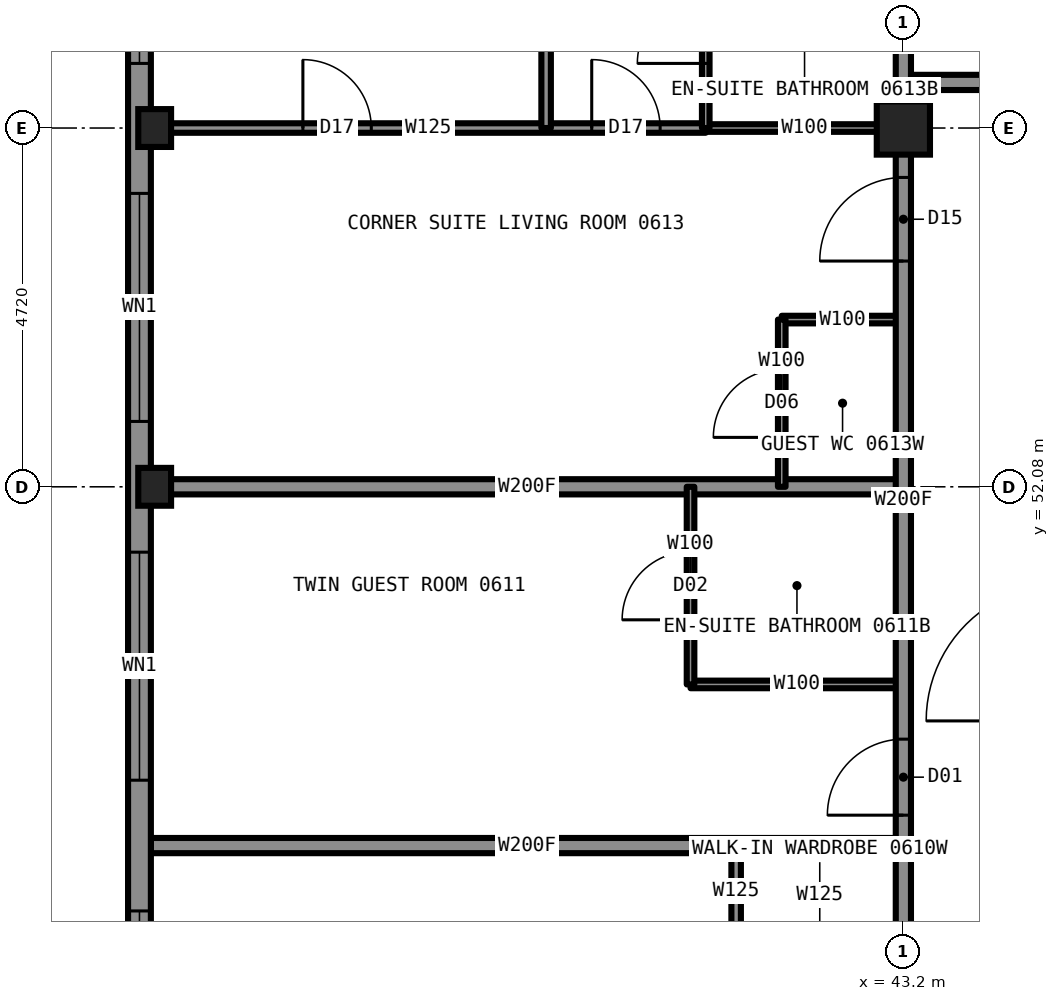
"""IFC4 building model, lengths in metres.
Left out: names, types, materials, properties, quantities, classifications, styles, units other than length and angle.
Written with IfcOpenShell. Run it as: python <this file> out.ifc"""

import sys

from ifc_helpers import new_model, si_unit, direction, frame, frame_2d, origin, origin_2d, place, context, subcontext, project, spatial, rectangle, hollow_rectangle, i_section, extrude, element, fill, save


model = new_model("IFC4")
c1 = context("Model", 3, precision=1e-05, world=origin(), true_north=direction((0.0, 1.0)))
c2 = subcontext(c1, "Body", "Model", "MODEL_VIEW")
j1 = project(units=[si_unit("LENGTHUNIT", "METRE"), si_unit("PLANEANGLEUNIT", "RADIAN")], contexts=[c1])
p1 = place(None, origin())
s1 = spatial("IfcSite", under=j1, at=p1, CompositionType="ELEMENT")
p2 = place(p1, origin())
s2 = spatial("IfcBuilding", under=s1, at=p2, CompositionType="ELEMENT")
p3 = place(p2, frame((0.0, 0.0, 28.5)))
s3 = spatial("IfcBuildingStorey", under=s2, at=p3, CompositionType="ELEMENT", Elevation=28.5)
for number, where, z_axis, x_axis in (
    (1, (33.35, 52.08, 0.0), (0.0, 0.0, 1.0), (1.0, 0.0, 0.0)),
    (2, (33.35, 56.8, 0.0), (0.0, 0.0, 1.0), (1.0, 0.0, 0.0)),
):
    element("IfcColumn", number, at=place(p3, frame(where, z_axis=z_axis, x_axis=x_axis)), inside=s3, PredefinedType="COLUMN", context=c2, shape_type="SweptSolid", body=[
        extrude(i_section(OverallWidth=0.432, OverallDepth=0.498, WebThickness=0.056, FlangeThickness=0.089, at=origin_2d()), origin(), (0.0, 0.0, 1.0), 3.5),
    ])
p4 = place(p3, frame((43.2, 56.8, 0.0), z_axis=(0.0, 0.0, 1.0), x_axis=(1.0, 0.0, 0.0)))
e3 = element("IfcColumn", 3, at=p4, inside=s3, PredefinedType="COLUMN", context=c2, shape_type="SweptSolid", body=[
    extrude(hollow_rectangle(XDim=0.7, YDim=0.7, WallThickness=0.06, at=origin_2d()), origin(), (0.0, 0.0, 1.0), 3.5),
])
p5 = place(p3, frame((40.6, 56.8, 0.0), z_axis=(0.0, 0.0, 1.0), x_axis=(1.0, 0.0, 0.0)))
e4 = element("IfcWall", 4, at=p5, inside=s3, PredefinedType="PARTITIONING", context=c2, shape_type="SweptSolid", body=[
    extrude(rectangle(XDim=2.6, YDim=0.1, at=frame_2d((1.3, 0.0))), origin(), (0.0, 0.0, 1.0), 2.573),
])
p6 = place(p3, frame((33.3, 56.8, 0.0), z_axis=(0.0, 0.0, 1.0), x_axis=(1.0, 0.0, 0.0)))
e5 = element("IfcWall", 5, at=p6, inside=s3, PredefinedType="PARTITIONING", context=c2, shape_type="SweptSolid", body=[
    extrude(rectangle(XDim=7.3, YDim=0.125, at=frame_2d((3.65, 0.0))), origin(), (0.0, 0.0, 1.0), 2.573),
])
p7 = place(p6, frame((5.8, 0.0, 0.0)))
e6 = element("IfcOpeningElement", 6, at=p7, cuts=e5, PredefinedType="OPENING", context=c2, shape_type="SweptSolid", body=[
    extrude(rectangle(XDim=0.9, YDim=2.2, at=frame_2d((0.45, 1.1))), frame((0.0, 0.073, 0.0), z_axis=(0.0, -1.0, 0.0), x_axis=(1.0, 0.0, 0.0)), (0.0, 0.0, 1.0), 0.145),
])
p8 = place(p6, frame((2.0, 0.0, 0.0)))
e7 = element("IfcOpeningElement", 7, at=p8, cuts=e5, PredefinedType="OPENING", context=c2, shape_type="SweptSolid", body=[
    extrude(rectangle(XDim=0.9, YDim=2.2, at=frame_2d((0.45, 1.1))), frame((0.0, 0.073, 0.0), z_axis=(0.0, -1.0, 0.0), x_axis=(1.0, 0.0, 0.0)), (0.0, 0.0, 1.0), 0.145),
])
p9 = place(p3, frame((43.2, 57.4, 0.0), z_axis=(0.0, 0.0, 1.0), x_axis=(1.0, 0.0, 0.0)))
e8 = element("IfcWall", 8, at=p9, inside=s3, PredefinedType="PARTITIONING", context=c2, shape_type="SweptSolid", body=[
    extrude(rectangle(XDim=23.6, YDim=0.2, at=frame_2d((11.8, 0.0))), origin(), (0.0, 0.0, 1.0), 3.33),
])
p10 = place(p9, frame((1.85, 0.0, 0.0)))
e9 = element("IfcOpeningElement", 9, at=p10, cuts=e8, PredefinedType="OPENING", context=c2, shape_type="SweptSolid", body=[
    extrude(rectangle(XDim=1.1, YDim=2.2, at=frame_2d((0.55, 1.1))), frame((0.0, 0.11, 0.0), z_axis=(0.0, -1.0, 0.0), x_axis=(1.0, 0.0, 0.0)), (0.0, 0.0, 1.0), 0.22),
])
p11 = place(p9, frame((15.62, 0.0, 0.0)))
e10 = element("IfcOpeningElement", 10, at=p11, cuts=e8, PredefinedType="OPENING", context=c2, shape_type="SweptSolid", body=[
    extrude(rectangle(XDim=1.0, YDim=2.2, at=frame_2d((0.5, 1.1))), frame((0.0, 0.11, 0.0), z_axis=(0.0, -1.0, 0.0), x_axis=(1.0, 0.0, 0.0)), (0.0, 0.0, 1.0), 0.22),
])
p12 = place(p9, frame((20.34, 0.0, 0.0)))
e11 = element("IfcOpeningElement", 11, at=p12, cuts=e8, PredefinedType="OPENING", context=c2, shape_type="SweptSolid", body=[
    extrude(rectangle(XDim=1.0, YDim=2.2, at=frame_2d((0.5, 1.1))), frame((0.0, 0.11, 0.0), z_axis=(0.0, -1.0, 0.0), x_axis=(1.0, 0.0, 0.0)), (0.0, 0.0, 1.0), 0.22),
])
p13 = place(p3, frame((33.3, 47.36, 0.0), z_axis=(0.0, 0.0, 1.0), x_axis=(1.0, 0.0, 0.0)))
e12 = element("IfcWall", 12, at=p13, inside=s3, PredefinedType="PARTITIONING", context=c2, shape_type="SweptSolid", body=[
    extrude(rectangle(XDim=9.9, YDim=0.2, at=frame_2d((4.95, 0.0))), origin(), (0.0, 0.0, 1.0), 2.723),
])
p14 = place(p3, frame((40.4, 49.48, 0.0), z_axis=(0.0, 0.0, 1.0), x_axis=(1.0, 0.0, 0.0)))
e13 = element("IfcWall", 13, at=p14, inside=s3, PredefinedType="PARTITIONING", context=c2, shape_type="SweptSolid", body=[
    extrude(rectangle(XDim=2.8, YDim=0.1, at=frame_2d((1.4, 0.0))), origin(), (0.0, 0.0, 1.0), 3.33),
])
p15 = place(p3, frame((33.3, 52.08, 0.0), z_axis=(0.0, 0.0, 1.0), x_axis=(1.0, 0.0, 0.0)))
e14 = element("IfcWall", 14, at=p15, inside=s3, PredefinedType="PARTITIONING", context=c2, shape_type="SweptSolid", body=[
    extrude(rectangle(XDim=9.9, YDim=0.2, at=frame_2d((4.95, 0.0))), origin(), (0.0, 0.0, 1.0), 2.573),
])
p16 = place(p3, frame((41.6, 54.28, 0.0), z_axis=(0.0, 0.0, 1.0), x_axis=(1.0, 0.0, 0.0)))
e15 = element("IfcWall", 15, at=p16, inside=s3, PredefinedType="PARTITIONING", context=c2, shape_type="SweptSolid", body=[
    extrude(rectangle(XDim=1.6, YDim=0.1, at=frame_2d((0.8, 0.0))), origin(), (0.0, 0.0, 1.0), 2.723),
])
p17 = place(p3, frame((43.2, 33.22, 0.0), z_axis=(0.0, 0.0, 1.0), x_axis=(0.0, 1.0, 0.0)))
e16 = element("IfcWall", 16, at=p17, inside=s3, PredefinedType="PARTITIONING", context=c2, shape_type="SweptSolid", body=[
    extrude(rectangle(XDim=23.56, YDim=0.2, at=frame_2d((11.78, 0.0))), origin(), (0.0, 0.0, 1.0), 3.33),
])
p18 = place(p17, frame((6.16, 0.0, 0.0)))
e17 = element("IfcOpeningElement", 17, at=p18, cuts=e16, PredefinedType="OPENING", context=c2, shape_type="SweptSolid", body=[
    extrude(rectangle(XDim=1.0, YDim=2.2, at=frame_2d((0.5, 1.1))), frame((0.0, 0.11, 0.0), z_axis=(0.0, -1.0, 0.0), x_axis=(1.0, 0.0, 0.0)), (0.0, 0.0, 1.0), 0.22),
])
p19 = place(p17, frame((11.68, 0.0, 0.0)))
e18 = element("IfcOpeningElement", 18, at=p19, cuts=e16, PredefinedType="OPENING", context=c2, shape_type="SweptSolid", body=[
    extrude(rectangle(XDim=1.0, YDim=2.2, at=frame_2d((0.5, 1.1))), frame((0.0, 0.11, 0.0), z_axis=(0.0, -1.0, 0.0), x_axis=(1.0, 0.0, 0.0)), (0.0, 0.0, 1.0), 0.22),
])
p20 = place(p17, frame((14.54, 0.0, 0.0)))
e19 = element("IfcOpeningElement", 19, at=p20, cuts=e16, PredefinedType="OPENING", context=c2, shape_type="SweptSolid", body=[
    extrude(rectangle(XDim=1.0, YDim=2.2, at=frame_2d((0.5, 1.1))), frame((0.0, 0.11, 0.0), z_axis=(0.0, -1.0, 0.0), x_axis=(1.0, 0.0, 0.0)), (0.0, 0.0, 1.0), 0.22),
])
p21 = place(p17, frame((21.83, 0.0, 0.0)))
e20 = element("IfcOpeningElement", 20, at=p21, cuts=e16, PredefinedType="OPENING", context=c2, shape_type="SweptSolid", body=[
    extrude(rectangle(XDim=1.1, YDim=2.2, at=frame_2d((0.55, 1.1))), frame((0.0, 0.11, 0.0), z_axis=(0.0, -1.0, 0.0), x_axis=(1.0, 0.0, 0.0)), (0.0, 0.0, 1.0), 0.22),
])
p22 = place(p17, frame((0.63, 0.0, 0.0)))
e21 = element("IfcOpeningElement", 21, at=p22, cuts=e16, PredefinedType="OPENING", context=c2, shape_type="SweptSolid", body=[
    extrude(rectangle(XDim=1.1, YDim=2.2, at=frame_2d((0.55, 1.1))), frame((0.0, 0.11, 0.0), z_axis=(0.0, -1.0, 0.0), x_axis=(1.0, 0.0, 0.0)), (0.0, 0.0, 1.0), 0.22),
])
p23 = place(p3, frame((43.2, 57.4, 0.0), z_axis=(0.0, 0.0, 1.0), x_axis=(0.0, 1.0, 0.0)))
e22 = element("IfcWall", 22, at=p23, inside=s3, PredefinedType="PARTITIONING", context=c2, shape_type="SweptSolid", body=[
    extrude(rectangle(XDim=2.0, YDim=0.2, at=frame_2d((1.0, 0.0))), origin(), (0.0, 0.0, 1.0), 2.573),
])
p24 = place(p3, frame((41.6, 52.08, 0.0), z_axis=(0.0, 0.0, 1.0), x_axis=(0.0, 1.0, 0.0)))
e23 = element("IfcWall", 23, at=p24, inside=s3, PredefinedType="PARTITIONING", context=c2, shape_type="SweptSolid", body=[
    extrude(rectangle(XDim=2.2, YDim=0.1, at=frame_2d((1.1, 0.0))), origin(), (0.0, 0.0, 1.0), 3.33),
])
p25 = place(p24, frame((0.65, 0.0, 0.0)))
e24 = element("IfcOpeningElement", 24, at=p25, cuts=e23, PredefinedType="OPENING", context=c2, shape_type="SweptSolid", body=[
    extrude(rectangle(XDim=0.9, YDim=2.1, at=frame_2d((0.45, 1.05))), frame((0.0, 0.06, 0.0), z_axis=(0.0, -1.0, 0.0), x_axis=(1.0, 0.0, 0.0)), (0.0, 0.0, 1.0), 0.12),
])
p26 = place(p3, frame((41.0, 46.16, 0.0), z_axis=(0.0, 0.0, 1.0), x_axis=(0.0, 1.0, 0.0)))
e25 = element("IfcWall", 25, at=p26, inside=s3, PredefinedType="PARTITIONING", context=c2, shape_type="SweptSolid", body=[
    extrude(rectangle(XDim=1.2, YDim=0.125, at=frame_2d((0.6, 0.0))), origin(), (0.0, 0.0, 1.0), 3.33),
])
p27 = place(p3, frame((40.6, 56.8, 0.0), z_axis=(0.0, 0.0, 1.0), x_axis=(0.0, 1.0, 0.0)))
e26 = element("IfcWall", 26, at=p27, inside=s3, PredefinedType="PARTITIONING", context=c2, shape_type="SweptSolid", body=[
    extrude(rectangle(XDim=2.6, YDim=0.1, at=frame_2d((1.3, 0.0))), origin(), (0.0, 0.0, 1.0), 3.33),
])
p28 = place(p27, frame((0.85, 0.0, 0.0)))
e27 = element("IfcOpeningElement", 27, at=p28, cuts=e26, PredefinedType="OPENING", context=c2, shape_type="SweptSolid", body=[
    extrude(rectangle(XDim=0.9, YDim=2.1, at=frame_2d((0.45, 1.05))), frame((0.0, 0.06, 0.0), z_axis=(0.0, -1.0, 0.0), x_axis=(1.0, 0.0, 0.0)), (0.0, 0.0, 1.0), 0.12),
])
p29 = place(p3, frame((40.4, 49.48, 0.0), z_axis=(0.0, 0.0, 1.0), x_axis=(0.0, 1.0, 0.0)))
e28 = element("IfcWall", 28, at=p29, inside=s3, PredefinedType="PARTITIONING", context=c2, shape_type="SweptSolid", body=[
    extrude(rectangle(XDim=2.6, YDim=0.1, at=frame_2d((1.3, 0.0))), origin(), (0.0, 0.0, 1.0), 3.33),
])
p30 = place(p29, frame((0.85, 0.0, 0.0)))
e29 = element("IfcOpeningElement", 29, at=p30, cuts=e28, PredefinedType="OPENING", context=c2, shape_type="SweptSolid", body=[
    extrude(rectangle(XDim=0.9, YDim=2.1, at=frame_2d((0.45, 1.05))), frame((0.0, 0.06, 0.0), z_axis=(0.0, -1.0, 0.0), x_axis=(1.0, 0.0, 0.0)), (0.0, 0.0, 1.0), 0.12),
])
p31 = place(p3, frame((38.5, 56.8, 0.0), z_axis=(0.0, 0.0, 1.0), x_axis=(0.0, 1.0, 0.0)))
e30 = element("IfcWall", 30, at=p31, inside=s3, PredefinedType="PARTITIONING", context=c2, shape_type="SweptSolid", body=[
    extrude(rectangle(XDim=9.894, YDim=0.125, at=frame_2d((4.947, 0.0))), origin(), (0.0, 0.0, 1.0), 3.33),
])
p32 = place(p3, frame((33.15, 61.5, 0.0), z_axis=(0.0, 0.0, 1.0), x_axis=(0.0, -1.0, 0.0)))
e31 = element("IfcWall", 31, at=p32, inside=s3, PredefinedType="SOLIDWALL", context=c2, shape_type="SweptSolid", body=[
    extrude(rectangle(XDim=33.0, YDim=0.3, at=frame_2d((16.5, 0.0))), origin(), (0.0, 0.0, 1.0), 2.83),
])
p33 = place(p32, frame((0.85, 0.0, 0.5)))
e32 = element("IfcOpeningElement", 32, at=p33, cuts=e31, PredefinedType="OPENING", context=c2, shape_type="SweptSolid", body=[
    extrude(rectangle(XDim=3.0, YDim=2.0, at=frame_2d((1.5, 1.0))), frame((0.0, 0.16, 0.0), z_axis=(0.0, -1.0, 0.0), x_axis=(1.0, 0.0, 0.0)), (0.0, 0.0, 1.0), 0.32),
])
p34 = place(p32, frame((5.56, 0.0, 0.5)))
e33 = element("IfcOpeningElement", 33, at=p34, cuts=e31, PredefinedType="OPENING", context=c2, shape_type="SweptSolid", body=[
    extrude(rectangle(XDim=3.0, YDim=2.0, at=frame_2d((1.5, 1.0))), frame((0.0, 0.16, 0.0), z_axis=(0.0, -1.0, 0.0), x_axis=(1.0, 0.0, 0.0)), (0.0, 0.0, 1.0), 0.32),
])
p35 = place(p32, frame((10.28, 0.0, 0.5)))
e34 = element("IfcOpeningElement", 34, at=p35, cuts=e31, PredefinedType="OPENING", context=c2, shape_type="SweptSolid", body=[
    extrude(rectangle(XDim=3.0, YDim=2.0, at=frame_2d((1.5, 1.0))), frame((0.0, 0.16, 0.0), z_axis=(0.0, -1.0, 0.0), x_axis=(1.0, 0.0, 0.0)), (0.0, 0.0, 1.0), 0.32),
])
p36 = place(p32, frame((15.0, 0.0, 0.5)))
e35 = element("IfcOpeningElement", 35, at=p36, cuts=e31, PredefinedType="OPENING", context=c2, shape_type="SweptSolid", body=[
    extrude(rectangle(XDim=3.0, YDim=2.0, at=frame_2d((1.5, 1.0))), frame((0.0, 0.16, 0.0), z_axis=(0.0, -1.0, 0.0), x_axis=(1.0, 0.0, 0.0)), (0.0, 0.0, 1.0), 0.32),
])
p37 = place(p32, frame((19.72, 0.0, 0.5)))
e36 = element("IfcOpeningElement", 36, at=p37, cuts=e31, PredefinedType="OPENING", context=c2, shape_type="SweptSolid", body=[
    extrude(rectangle(XDim=3.0, YDim=2.0, at=frame_2d((1.5, 1.0))), frame((0.0, 0.16, 0.0), z_axis=(0.0, -1.0, 0.0), x_axis=(1.0, 0.0, 0.0)), (0.0, 0.0, 1.0), 0.32),
])
p38 = place(p32, frame((24.44, 0.0, 0.5)))
e37 = element("IfcOpeningElement", 37, at=p38, cuts=e31, PredefinedType="OPENING", context=c2, shape_type="SweptSolid", body=[
    extrude(rectangle(XDim=3.0, YDim=2.0, at=frame_2d((1.5, 1.0))), frame((0.0, 0.16, 0.0), z_axis=(0.0, -1.0, 0.0), x_axis=(1.0, 0.0, 0.0)), (0.0, 0.0, 1.0), 0.32),
])
p39 = place(p32, frame((29.15, 0.0, 0.5)))
e38 = element("IfcOpeningElement", 38, at=p39, cuts=e31, PredefinedType="OPENING", context=c2, shape_type="SweptSolid", body=[
    extrude(rectangle(XDim=3.0, YDim=2.0, at=frame_2d((1.5, 1.0))), frame((0.0, 0.16, 0.0), z_axis=(0.0, -1.0, 0.0), x_axis=(1.0, 0.0, 0.0)), (0.0, 0.0, 1.0), 0.32),
])
p40 = place(p3, frame((43.2, 56.78, 0.0), z_axis=(0.0, 0.0, 1.0), x_axis=(0.0, 1.0, 0.0)))
e39 = element("IfcWall", 39, at=p40, inside=s3, PredefinedType="PARTITIONING", context=c2, shape_type="SweptSolid", body=[
    extrude(rectangle(XDim=0.62, YDim=0.2, at=frame_2d((0.31, 0.0))), origin(), (0.0, 0.0, 1.0), 2.573),
])
p41 = place(p20, origin())
e40 = element("IfcDoor", 40, at=p41, inside=s3, OperationType="SINGLE_SWING_LEFT", PredefinedType="DOOR", context=c2, shape_type="SweptSolid", body=[
    extrude(rectangle(XDim=1.0, YDim=2.2, at=frame_2d((0.5, 1.1))), frame((0.0, 0.025, 0.0), z_axis=(0.0, -1.0, 0.0), x_axis=(1.0, 0.0, 0.0)), (0.0, 0.0, 1.0), 0.05),
])
fill(e19, e40)
p42 = place(p30, origin())
e41 = element("IfcDoor", 41, at=p42, inside=s3, OperationType="SINGLE_SWING_RIGHT", PredefinedType="DOOR", context=c2, shape_type="SweptSolid", body=[
    extrude(rectangle(XDim=0.9, YDim=2.1, at=frame_2d((0.45, 1.05))), frame((0.0, 0.025, 0.0), z_axis=(0.0, -1.0, 0.0), x_axis=(1.0, 0.0, 0.0)), (0.0, 0.0, 1.0), 0.05),
])
fill(e29, e41)
p43 = place(p21, origin())
e42 = element("IfcDoor", 42, at=p43, inside=s3, OperationType="SINGLE_SWING_LEFT", PredefinedType="DOOR", context=c2, shape_type="SweptSolid", body=[
    extrude(rectangle(XDim=1.1, YDim=2.2, at=frame_2d((0.55, 1.1))), frame((0.0, 0.025, 0.0), z_axis=(0.0, -1.0, 0.0), x_axis=(1.0, 0.0, 0.0)), (0.0, 0.0, 1.0), 0.05),
])
fill(e20, e42)
p44 = place(p28, origin())
e43 = element("IfcDoor", 43, at=p44, inside=s3, OperationType="SINGLE_SWING_RIGHT", PredefinedType="DOOR", context=c2, shape_type="SweptSolid", body=[
    extrude(rectangle(XDim=0.9, YDim=2.1, at=frame_2d((0.45, 1.05))), frame((0.0, 0.025, 0.0), z_axis=(0.0, -1.0, 0.0), x_axis=(1.0, 0.0, 0.0)), (0.0, 0.0, 1.0), 0.05),
])
fill(e27, e43)
p45 = place(p7, origin())
e44 = element("IfcDoor", 44, at=p45, inside=s3, OperationType="SINGLE_SWING_LEFT", PredefinedType="DOOR", context=c2, shape_type="SweptSolid", body=[
    extrude(rectangle(XDim=0.9, YDim=2.2, at=frame_2d((0.45, 1.1))), frame((0.0, 0.025, 0.0), z_axis=(0.0, -1.0, 0.0), x_axis=(1.0, 0.0, 0.0)), (0.0, 0.0, 1.0), 0.05),
])
fill(e6, e44)
p46 = place(p8, origin())
e45 = element("IfcDoor", 45, at=p46, inside=s3, OperationType="SINGLE_SWING_LEFT", PredefinedType="DOOR", context=c2, shape_type="SweptSolid", body=[
    extrude(rectangle(XDim=0.9, YDim=2.2, at=frame_2d((0.45, 1.1))), frame((0.0, 0.025, 0.0), z_axis=(0.0, -1.0, 0.0), x_axis=(1.0, 0.0, 0.0)), (0.0, 0.0, 1.0), 0.05),
])
fill(e7, e45)
p47 = place(p25, origin())
e46 = element("IfcDoor", 46, at=p47, inside=s3, OperationType="SINGLE_SWING_LEFT", PredefinedType="DOOR", context=c2, shape_type="SweptSolid", body=[
    extrude(rectangle(XDim=0.9, YDim=2.1, at=frame_2d((0.45, 1.05))), frame((0.0, 0.025, 0.0), z_axis=(0.0, -1.0, 0.0), x_axis=(1.0, 0.0, 0.0)), (0.0, 0.0, 1.0), 0.05),
])
fill(e24, e46)
p48 = place(p33, origin())
e47 = element("IfcWindow", 47, at=p48, inside=s3, PartitioningType="SINGLE_PANEL", PredefinedType="WINDOW", context=c2, shape_type="SweptSolid", body=[
    extrude(rectangle(XDim=3.0, YDim=2.0, at=frame_2d((1.5, 1.0))), frame((0.0, 0.03, 0.0), z_axis=(0.0, -1.0, 0.0), x_axis=(1.0, 0.0, 0.0)), (0.0, 0.0, 1.0), 0.06),
])
fill(e32, e47)
p49 = place(p34, origin())
e48 = element("IfcWindow", 48, at=p49, inside=s3, PartitioningType="SINGLE_PANEL", PredefinedType="WINDOW", context=c2, shape_type="SweptSolid", body=[
    extrude(rectangle(XDim=3.0, YDim=2.0, at=frame_2d((1.5, 1.0))), frame((0.0, 0.03, 0.0), z_axis=(0.0, -1.0, 0.0), x_axis=(1.0, 0.0, 0.0)), (0.0, 0.0, 1.0), 0.06),
])
fill(e33, e48)
p50 = place(p35, origin())
e49 = element("IfcWindow", 49, at=p50, inside=s3, PartitioningType="SINGLE_PANEL", PredefinedType="WINDOW", context=c2, shape_type="SweptSolid", body=[
    extrude(rectangle(XDim=3.0, YDim=2.0, at=frame_2d((1.5, 1.0))), frame((0.0, 0.03, 0.0), z_axis=(0.0, -1.0, 0.0), x_axis=(1.0, 0.0, 0.0)), (0.0, 0.0, 1.0), 0.06),
])
fill(e34, e49)
p51 = place(p36, origin())
e50 = element("IfcWindow", 50, at=p51, inside=s3, PartitioningType="SINGLE_PANEL", PredefinedType="WINDOW", context=c2, shape_type="SweptSolid", body=[
    extrude(rectangle(XDim=3.0, YDim=2.0, at=frame_2d((1.5, 1.0))), frame((0.0, 0.03, 0.0), z_axis=(0.0, -1.0, 0.0), x_axis=(1.0, 0.0, 0.0)), (0.0, 0.0, 1.0), 0.06),
])
fill(e35, e50)
save(model, sys.argv[1])
